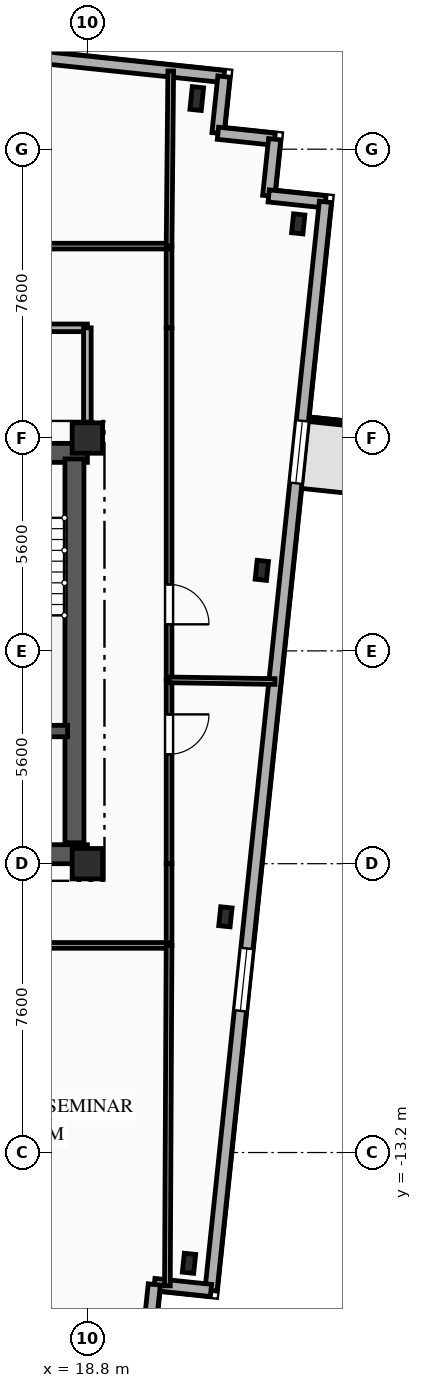
"""IFC4 building model, lengths in metres.
Left out: names, types, materials, properties, quantities, classifications, styles, units other than length and angle.
Written with IfcOpenShell. Run it as: python <this file> out.ifc"""

import sys

from ifc_helpers import new_model, si_unit, direction, frame, frame_2d, origin, origin_2d, place, context, subcontext, project, spatial, rectangle, i_section, extrude, element, fill, save


model = new_model("IFC4")
c1 = context("Model", 3, precision=1e-05, world=origin(), true_north=direction((0.0, 1.0)))
c2 = subcontext(c1, "Body", "Model", "MODEL_VIEW")
j1 = project(units=[si_unit("LENGTHUNIT", "METRE"), si_unit("PLANEANGLEUNIT", "RADIAN")], contexts=[c1])
p1 = place(None, origin())
s1 = spatial("IfcSite", under=j1, at=p1, CompositionType="ELEMENT")
p2 = place(p1, origin())
s2 = spatial("IfcBuilding", under=s1, at=p2, CompositionType="ELEMENT")
p3 = place(p2, frame((0.0, 0.0, 196.4)))
s3 = spatial("IfcBuildingStorey", under=s2, at=p3, CompositionType="ELEMENT", Elevation=196.4)
for number, where, z_axis, x_axis in (
    (1, (18.8, -5.6, 0.0), (0.0, 0.0, 1.0), (1.0, 0.0, 0.0)),
    (2, (18.8, 5.6, 0.0), (0.0, 0.0, 1.0), (1.0, 0.0, 0.0)),
):
    element("IfcColumn", number, at=place(p3, frame(where, z_axis=z_axis, x_axis=x_axis)), inside=s3, PredefinedType="COLUMN", context=c2, shape_type="SweptSolid", body=[
        extrude(rectangle(XDim=0.8, YDim=0.8, at=origin_2d()), origin(), (0.0, 0.0, 1.0), 3.35),
    ])
p4 = place(p3, frame((21.679, 14.532, 0.0), z_axis=(0.0, 0.0, 1.0), x_axis=(0.994521895368, -0.104528463268, 0.0)))
e3 = element("IfcColumn", 3, at=p4, inside=s3, PredefinedType="COLUMN", context=c2, shape_type="SweptSolid", body=[
    extrude(i_section(OverallWidth=0.3, OverallDepth=0.6, WebThickness=0.015, FlangeThickness=0.03, FilletRadius=0.027, at=origin_2d()), origin(), (0.0, 0.0, 1.0), 3.35),
])
for number, where, z_axis, x_axis in (
    (4, (21.474, -16.114, 0.0), (0.0, 0.0, 1.0), (0.995, -0.105, 0.0)),
    (5, (22.433, -6.998, 0.0), (0.0, 0.0, 1.0), (0.995, -0.105, 0.0)),
    (6, (23.391, 2.119, 0.0), (0.0, 0.0, 1.0), (0.995, -0.105, 0.0)),
    (7, (24.349, 11.235, 0.0), (0.0, 0.0, 1.0), (0.995, -0.105, 0.0)),
):
    element("IfcColumn", number, at=place(p3, frame(where, z_axis=z_axis, x_axis=x_axis)), inside=s3, PredefinedType="COLUMN", context=c2, shape_type="SweptSolid", body=[
        extrude(i_section(OverallWidth=0.3, OverallDepth=0.5, WebThickness=0.014, FlangeThickness=0.028, FilletRadius=0.027, at=origin_2d()), origin(), (0.0, 0.0, 1.0), 3.35),
    ])
p5 = place(p3, frame((-23.156, 19.898, 0.0), z_axis=(0.0, 0.0, 1.0), x_axis=(0.994522001802, -0.104527450613, 0.0)))
e8 = element("IfcWall", 8, at=p5, inside=s3, PredefinedType="SOLIDWALL", context=c2, shape_type="SweptSolid", body=[
    extrude(rectangle(XDim=45.8, YDim=0.32, at=frame_2d((22.9, 0.0))), origin(), (0.0, 0.0, 1.0), 3.04),
])
p6 = place(p5, frame((4.139, 0.0, 0.85)))
e9 = element("IfcOpeningElement", 9, at=p6, cuts=e8, PredefinedType="OPENING", context=c2, shape_type="SweptSolid", body=[
    extrude(rectangle(XDim=1.65, YDim=1.85, at=frame_2d((0.825, 0.925))), frame((0.0, 0.17, 0.0), z_axis=(0.0, -1.0, 0.0), x_axis=(1.0, 0.0, 0.0)), (0.0, 0.0, 1.0), 0.34),
])
p7 = place(p5, frame((9.384, 0.0, 0.85)))
e10 = element("IfcOpeningElement", 10, at=p7, cuts=e8, PredefinedType="OPENING", context=c2, shape_type="SweptSolid", body=[
    extrude(rectangle(XDim=1.65, YDim=1.85, at=frame_2d((0.825, 0.925))), frame((0.0, 0.17, 0.0), z_axis=(0.0, -1.0, 0.0), x_axis=(1.0, 0.0, 0.0)), (0.0, 0.0, 1.0), 0.34),
])
p8 = place(p5, frame((18.497, 0.0, 0.85)))
e11 = element("IfcOpeningElement", 11, at=p8, cuts=e8, PredefinedType="OPENING", context=c2, shape_type="SweptSolid", body=[
    extrude(rectangle(XDim=1.6, YDim=1.85, at=frame_2d((0.8, 0.925))), frame((0.0, 0.17, 0.0), z_axis=(0.0, -1.0, 0.0), x_axis=(1.0, 0.0, 0.0)), (0.0, 0.0, 1.0), 0.34),
])
p9 = place(p5, frame((27.525, 0.0, 0.85)))
e12 = element("IfcOpeningElement", 12, at=p9, cuts=e8, PredefinedType="OPENING", context=c2, shape_type="SweptSolid", body=[
    extrude(rectangle(XDim=2.2, YDim=1.85, at=frame_2d((1.1, 0.925))), frame((0.0, 0.17, 0.0), z_axis=(0.0, -1.0, 0.0), x_axis=(1.0, 0.0, 0.0)), (0.0, 0.0, 1.0), 0.34),
])
p10 = place(p5, frame((38.329, 0.0, 0.85)))
e13 = element("IfcOpeningElement", 13, at=p10, cuts=e8, PredefinedType="OPENING", context=c2, shape_type="SweptSolid", body=[
    extrude(rectangle(XDim=1.65, YDim=1.85, at=frame_2d((0.825, 0.925))), frame((0.0, 0.17, 0.0), z_axis=(0.0, -1.0, 0.0), x_axis=(1.0, 0.0, 0.0)), (0.0, 0.0, 1.0), 0.34),
])
p11 = place(p3, frame((22.393, 15.111, 0.0), z_axis=(0.0, 0.0, 1.0), x_axis=(-0.104481464157, -0.994526834051, 0.0)))
e14 = element("IfcWall", 14, at=p11, inside=s3, PredefinedType="SOLIDWALL", context=c2, shape_type="SweptSolid", body=[
    extrude(rectangle(XDim=1.5, YDim=0.32, at=frame_2d((0.75, 0.0))), origin(), (0.0, 0.0, 1.0), 3.04),
])
for number, where, z_axis, x_axis in (
    (15, (22.237, 13.619, 0.0), (0.0, 0.0, 1.0), (0.995, -0.104, 0.0)),
    (16, (23.728, 13.462, 0.0), (0.0, 0.0, 1.0), (-0.104, -0.995, 0.0)),
    (17, (23.572, 11.971, 0.0), (0.0, 0.0, 1.0), (0.995, -0.105, 0.0)),
):
    element("IfcWall", number, at=place(p3, frame(where, z_axis=z_axis, x_axis=x_axis)), inside=s3, PredefinedType="SOLIDWALL", context=c2, shape_type="SweptSolid", body=[
        extrude(rectangle(XDim=1.5, YDim=0.32, at=frame_2d((0.75, 0.0))), origin(), (0.0, 0.0, 1.0), 3.04),
    ])
p12 = place(p3, frame((25.063, 11.814, 0.0), z_axis=(0.0, 0.0, 1.0), x_axis=(-0.104523275986, -0.99452244056, 0.0)))
e18 = element("IfcWall", 18, at=p12, inside=s3, PredefinedType="SOLIDWALL", context=c2, shape_type="SweptSolid", body=[
    extrude(rectangle(XDim=28.8, YDim=0.32, at=frame_2d((14.4, 0.0))), origin(), (0.0, 0.0, 1.0), 3.04),
])
p13 = place(p12, frame((5.793, 0.0, 0.85)))
e19 = element("IfcOpeningElement", 19, at=p13, cuts=e18, PredefinedType="OPENING", context=c2, shape_type="SweptSolid", body=[
    extrude(rectangle(XDim=1.65, YDim=1.85, at=frame_2d((0.825, 0.925))), frame((0.0, 0.17, 0.0), z_axis=(0.0, -1.0, 0.0), x_axis=(1.0, 0.0, 0.0)), (0.0, 0.0, 1.0), 0.34),
])
p14 = place(p12, frame((19.752, 0.0, 0.85)))
e20 = element("IfcOpeningElement", 20, at=p14, cuts=e18, PredefinedType="OPENING", context=c2, shape_type="SweptSolid", body=[
    extrude(rectangle(XDim=1.65, YDim=1.85, at=frame_2d((0.825, 0.925))), frame((0.0, 0.17, 0.0), z_axis=(0.0, -1.0, 0.0), x_axis=(1.0, 0.0, 0.0)), (0.0, 0.0, 1.0), 0.34),
])
p15 = place(p3, frame((22.053, -16.828, 0.0), z_axis=(0.0, 0.0, 1.0), x_axis=(-0.994526834051, 0.104481464157, 0.0)))
e21 = element("IfcWall", 21, at=p15, inside=s3, PredefinedType="SOLIDWALL", context=c2, shape_type="SweptSolid", body=[
    extrude(rectangle(XDim=1.5, YDim=0.32, at=frame_2d((0.75, 0.0))), origin(), (0.0, 0.0, 1.0), 3.04),
])
p16 = place(p3, frame((20.561, -16.672, 0.0), z_axis=(0.0, 0.0, 1.0), x_axis=(-0.104498377516, -0.994525057048, 0.0)))
e22 = element("IfcWall", 22, at=p16, inside=s3, PredefinedType="SOLIDWALL", context=c2, shape_type="SweptSolid", body=[
    extrude(rectangle(XDim=1.5, YDim=0.32, at=frame_2d((0.75, 0.0))), origin(), (0.0, 0.0, 1.0), 3.04),
])
p17 = place(p3, frame((9.2, 5.21, 0.0), z_axis=(0.0, 0.0, 1.0), x_axis=(1.0, 0.0, 0.0)))
e23 = element("IfcWall", 23, at=p17, inside=s3, PredefinedType="SHEAR", context=c2, shape_type="SweptSolid", body=[
    extrude(rectangle(XDim=9.6, YDim=0.5, at=frame_2d((4.8, 0.0))), origin(), (0.0, 0.0, 1.0), 3.04),
])
p18 = place(p17, frame((6.95, 0.0, 0.0)))
e24 = element("IfcOpeningElement", 24, at=p18, cuts=e23, PredefinedType="OPENING", context=c2, shape_type="SweptSolid", body=[
    extrude(rectangle(XDim=1.1, YDim=2.15, at=frame_2d((0.55, 1.075))), frame((0.0, 0.26, 0.0), z_axis=(0.0, -1.0, 0.0), x_axis=(1.0, 0.0, 0.0)), (0.0, 0.0, 1.0), 0.52),
])
p19 = place(p17, frame((3.775, 0.0, 0.0)))
e25 = element("IfcOpeningElement", 25, at=p19, cuts=e23, PredefinedType="OPENING", context=c2, shape_type="SweptSolid", body=[
    extrude(rectangle(XDim=1.05, YDim=2.1, at=frame_2d((0.525, 1.05))), frame((0.0, 0.26, 0.0), z_axis=(0.0, -1.0, 0.0), x_axis=(1.0, 0.0, 0.0)), (0.0, 0.0, 1.0), 0.52),
])
p20 = place(p3, frame((9.2, -5.35, 0.0), z_axis=(0.0, 0.0, 1.0), x_axis=(1.0, 0.0, 0.0)))
e26 = element("IfcWall", 26, at=p20, inside=s3, PredefinedType="SHEAR", context=c2, shape_type="SweptSolid", body=[
    extrude(rectangle(XDim=9.6, YDim=0.5, at=frame_2d((4.8, 0.0))), origin(), (0.0, 0.0, 1.0), 3.04),
])
p21 = place(p20, frame((7.65, 0.0, 0.0)))
e27 = element("IfcOpeningElement", 27, at=p21, cuts=e26, PredefinedType="OPENING", context=c2, shape_type="SweptSolid", body=[
    extrude(rectangle(XDim=0.9, YDim=2.1, at=frame_2d((0.45, 1.05))), frame((0.0, 0.26, 0.0), z_axis=(0.0, -1.0, 0.0), x_axis=(1.0, 0.0, 0.0)), (0.0, 0.0, 1.0), 0.52),
])
p22 = place(p3, frame((18.46, -5.05, 0.0), z_axis=(0.0, 0.0, 1.0), x_axis=(0.0, 1.0, 0.0)))
e28 = element("IfcWall", 28, at=p22, inside=s3, PredefinedType="SHEAR", context=c2, shape_type="SweptSolid", body=[
    extrude(rectangle(XDim=10.1, YDim=0.5, at=frame_2d((5.05, 0.0))), origin(), (0.0, 0.0, 1.0), 3.04),
])
p23 = place(p3, frame((15.1, -2.11, 0.0), z_axis=(0.0, 0.0, 1.0), x_axis=(1.0, 0.0, 0.0)))
e29 = element("IfcWall", 29, at=p23, inside=s3, PredefinedType="SHEAR", context=c2, shape_type="SweptSolid", body=[
    extrude(rectangle(XDim=3.18, YDim=0.3, at=frame_2d((1.59, 0.0))), origin(), (0.0, 0.0, 1.0), 3.04),
])
p24 = place(p3, frame((18.8, 8.5, 0.0), z_axis=(0.0, 0.0, 1.0), x_axis=(-1.0, 0.0, 0.0)))
e30 = element("IfcWall", 30, at=p24, inside=s3, PredefinedType="PARTITIONING", context=c2, shape_type="SweptSolid", body=[
    extrude(rectangle(XDim=6.8, YDim=0.2, at=frame_2d((3.4, 0.0))), origin(), (0.0, 0.0, 1.0), 3.04),
])
p25 = place(p24, frame((3.985, 0.0, 0.0)))
e31 = element("IfcOpeningElement", 31, at=p25, cuts=e30, PredefinedType="OPENING", context=c2, shape_type="SweptSolid", body=[
    extrude(rectangle(XDim=1.1, YDim=2.15, at=frame_2d((0.55, 1.075))), frame((0.0, 0.11, 0.0), z_axis=(0.0, -1.0, 0.0), x_axis=(1.0, 0.0, 0.0)), (0.0, 0.0, 1.0), 0.22),
])
p26 = place(p3, frame((18.8, 5.6, 0.0), z_axis=(0.0, 0.0, 1.0), x_axis=(0.0, 1.0, 0.0)))
e32 = element("IfcWall", 32, at=p26, inside=s3, PredefinedType="PARTITIONING", context=c2, shape_type="SweptSolid", body=[
    extrude(rectangle(XDim=2.9, YDim=0.2, at=frame_2d((1.45, 0.0))), origin(), (0.0, 0.0, 1.0), 2.665),
])
p27 = place(p3, frame((20.95, 10.65, 0.0), z_axis=(0.0, 0.0, 1.0), x_axis=(0.0, -1.0, 0.0)))
e33 = element("IfcWall", 33, at=p27, inside=s3, PredefinedType="PARTITIONING", context=c2, shape_type="SweptSolid", body=[
    extrude(rectangle(XDim=2.15, YDim=0.15, at=frame_2d((1.075, 0.0))), origin(), (0.0, 0.0, 1.0), 3.04),
])
p28 = place(p3, frame((10.475, 10.65, 0.0), z_axis=(0.0, 0.0, 1.0), x_axis=(1.0, 0.0, 0.0)))
e34 = element("IfcWall", 34, at=p28, inside=s3, PredefinedType="PARTITIONING", context=c2, shape_type="SweptSolid", body=[
    extrude(rectangle(XDim=10.475, YDim=0.15, at=frame_2d((5.237, 0.0))), origin(), (0.0, 0.0, 1.0), 3.04),
])
p29 = place(p28, frame((5.746, 0.0, 0.0)))
e35 = element("IfcOpeningElement", 35, at=p29, cuts=e34, PredefinedType="OPENING", context=c2, shape_type="SweptSolid", body=[
    extrude(rectangle(XDim=1.05, YDim=2.15, at=frame_2d((0.525, 1.075))), frame((0.0, 0.085, 0.0), z_axis=(0.0, -1.0, 0.0), x_axis=(1.0, 0.0, 0.0)), (0.0, 0.0, 1.0), 0.17),
])
p30 = place(p3, frame((20.95, -5.6, 0.0), z_axis=(0.0, 0.0, 1.0), x_axis=(0.0, -1.0, 0.0)))
e36 = element("IfcWall", 36, at=p30, inside=s3, PredefinedType="PARTITIONING", context=c2, shape_type="SweptSolid", body=[
    extrude(rectangle(XDim=2.15, YDim=0.15, at=frame_2d((1.075, 0.0))), origin(), (0.0, 0.0, 1.0), 3.04),
])
p31 = place(p3, frame((20.95, -7.75, 0.0), z_axis=(0.0, 0.0, 1.0), x_axis=(-1.0, 0.0, 0.0)))
e37 = element("IfcWall", 37, at=p31, inside=s3, PredefinedType="PARTITIONING", context=c2, shape_type="SweptSolid", body=[
    extrude(rectangle(XDim=6.983, YDim=0.15, at=frame_2d((3.492, 0.0))), origin(), (0.0, 0.0, 1.0), 3.04),
])
p32 = place(p31, frame((4.757, 0.0, 0.0)))
e38 = element("IfcOpeningElement", 38, at=p32, cuts=e37, PredefinedType="OPENING", context=c2, shape_type="SweptSolid", body=[
    extrude(rectangle(XDim=1.05, YDim=2.15, at=frame_2d((0.525, 1.075))), frame((0.0, 0.085, 0.0), z_axis=(0.0, -1.0, 0.0), x_axis=(1.0, 0.0, 0.0)), (0.0, 0.0, 1.0), 0.17),
])
p33 = place(p3, frame((20.95, -0.763, 0.0), z_axis=(0.0, 0.0, 1.0), x_axis=(0.0, -1.0, 0.0)))
e39 = element("IfcWall", 39, at=p33, inside=s3, PredefinedType="PARTITIONING", context=c2, shape_type="SweptSolid", body=[
    extrude(rectangle(XDim=4.837, YDim=0.15, at=frame_2d((2.418, 0.0))), origin(), (0.0, 0.0, 1.0), 2.695),
])
p34 = place(p33, frame((0.908, 0.0, 0.0)))
e40 = element("IfcOpeningElement", 40, at=p34, cuts=e39, PredefinedType="OPENING", context=c2, shape_type="SweptSolid", body=[
    extrude(rectangle(XDim=1.05, YDim=2.15, at=frame_2d((0.525, 1.075))), frame((0.0, 0.085, 0.0), z_axis=(0.0, -1.0, 0.0), x_axis=(1.0, 0.0, 0.0)), (0.0, 0.0, 1.0), 0.17),
])
p35 = place(p3, frame((20.95, 8.5, 0.0), z_axis=(0.0, 0.0, 1.0), x_axis=(0.0, -1.0, 0.0)))
e41 = element("IfcWall", 41, at=p35, inside=s3, PredefinedType="PARTITIONING", context=c2, shape_type="SweptSolid", body=[
    extrude(rectangle(XDim=9.263, YDim=0.15, at=frame_2d((4.632, 0.0))), origin(), (0.0, 0.0, 1.0), 2.695),
])
p36 = place(p35, frame((6.751, 0.0, 0.0)))
e42 = element("IfcOpeningElement", 42, at=p36, cuts=e41, PredefinedType="OPENING", context=c2, shape_type="SweptSolid", body=[
    extrude(rectangle(XDim=1.05, YDim=2.15, at=frame_2d((0.525, 1.075))), frame((0.0, 0.085, 0.0), z_axis=(0.0, -1.0, 0.0), x_axis=(1.0, 0.0, 0.0)), (0.0, 0.0, 1.0), 0.17),
])
p37 = place(p3, frame((20.95, -0.763, 0.0), z_axis=(0.0, 0.0, 1.0), x_axis=(0.999875696831, -0.015766765259, 0.0)))
e43 = element("IfcWall", 43, at=p37, inside=s3, PredefinedType="PARTITIONING", context=c2, shape_type="SweptSolid", body=[
    extrude(rectangle(XDim=2.787, YDim=0.15, at=frame_2d((1.394, 0.0))), origin(), (0.0, 0.0, 1.0), 3.04),
])
p38 = place(p3, frame((20.906, -16.708, 0.0), z_axis=(0.0, 0.0, 1.0), x_axis=(0.004905642486, 0.999987967264, 0.0)))
e44 = element("IfcWall", 44, at=p38, inside=s3, PredefinedType="PARTITIONING", context=c2, shape_type="SweptSolid", body=[
    extrude(rectangle(XDim=8.958, YDim=0.15, at=frame_2d((4.479, 0.0))), origin(), (0.0, 0.0, 1.0), 2.665),
])
p39 = place(p3, frame((20.95, 10.65, 0.0), z_axis=(0.0, 0.0, 1.0), x_axis=(0.009535990233, 0.999954531411, 0.0)))
e45 = element("IfcWall", 45, at=p39, inside=s3, PredefinedType="PARTITIONING", context=c2, shape_type="SweptSolid", body=[
    extrude(rectangle(XDim=4.608, YDim=0.15, at=frame_2d((2.304, 0.0))), origin(), (0.0, 0.0, 1.0), 2.665),
])
p40 = place(p13, origin())
e46 = element("IfcWindow", 46, at=p40, inside=s3, PartitioningType="SINGLE_PANEL", PredefinedType="WINDOW", context=c2, shape_type="SweptSolid", body=[
    extrude(rectangle(XDim=1.65, YDim=1.85, at=frame_2d((0.825, 0.925))), frame((0.0, 0.03, 0.0), z_axis=(0.0, -1.0, 0.0), x_axis=(1.0, 0.0, 0.0)), (0.0, 0.0, 1.0), 0.06),
])
fill(e19, e46)
p41 = place(p14, origin())
e47 = element("IfcWindow", 47, at=p41, inside=s3, PartitioningType="SINGLE_PANEL", PredefinedType="WINDOW", context=c2, shape_type="SweptSolid", body=[
    extrude(rectangle(XDim=1.65, YDim=1.85, at=frame_2d((0.825, 0.925))), frame((0.0, 0.03, 0.0), z_axis=(0.0, -1.0, 0.0), x_axis=(1.0, 0.0, 0.0)), (0.0, 0.0, 1.0), 0.06),
])
fill(e20, e47)
p42 = place(p34, origin())
e48 = element("IfcDoor", 48, at=p42, inside=s3, OperationType="SINGLE_SWING_LEFT", PredefinedType="DOOR", context=c2, shape_type="SweptSolid", body=[
    extrude(rectangle(XDim=1.05, YDim=2.15, at=frame_2d((0.525, 1.075))), frame((0.0, 0.025, 0.0), z_axis=(0.0, -1.0, 0.0), x_axis=(1.0, 0.0, 0.0)), (0.0, 0.0, 1.0), 0.05),
])
fill(e40, e48)
p43 = place(p36, origin())
e49 = element("IfcDoor", 49, at=p43, inside=s3, OperationType="SINGLE_SWING_RIGHT", PredefinedType="DOOR", context=c2, shape_type="SweptSolid", body=[
    extrude(rectangle(XDim=1.05, YDim=2.15, at=frame_2d((0.525, 1.075))), frame((0.0, 0.025, 0.0), z_axis=(0.0, -1.0, 0.0), x_axis=(1.0, 0.0, 0.0)), (0.0, 0.0, 1.0), 0.05),
])
fill(e42, e49)
save(model, sys.argv[1])
